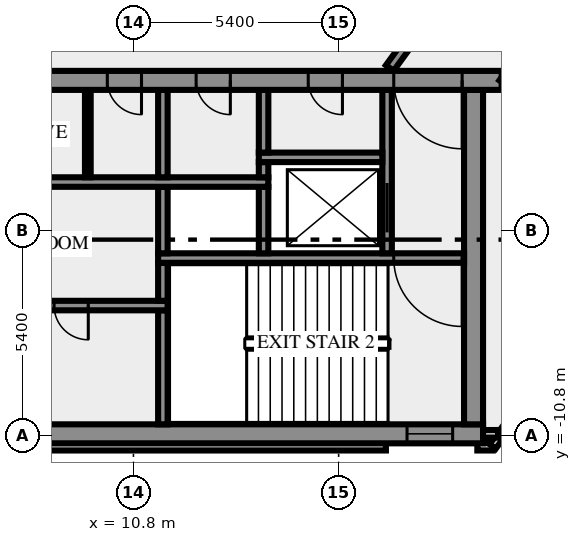
"""IFC4 building model, lengths in metres.
Left out: names, types, materials, properties, quantities, classifications, styles, units other than length and angle.
Written with IfcOpenShell. Run it as: python <this file> out.ifc"""

import sys

from ifc_helpers import new_model, si_unit, direction, frame, frame_2d, origin, place, context, subcontext, project, spatial, rectangle, extrude, element, fill, save


model = new_model("IFC4")
c1 = context("Model", 3, precision=1e-05, world=origin(), true_north=direction((0.0, 1.0)))
c2 = subcontext(c1, "Body", "Model", "MODEL_VIEW")
j1 = project(units=[si_unit("LENGTHUNIT", "METRE"), si_unit("PLANEANGLEUNIT", "RADIAN")], contexts=[c1])
p1 = place(None, origin())
s1 = spatial("IfcSite", under=j1, at=p1, CompositionType="ELEMENT")
p2 = place(p1, origin())
s2 = spatial("IfcBuilding", under=s1, at=p2, CompositionType="ELEMENT")
p3 = place(p2, frame((0.0, 0.0, 281.0)))
s3 = spatial("IfcBuildingStorey", under=s2, at=p3, CompositionType="ELEMENT", Elevation=281.0)
p4 = place(p3, frame((-17.444, -11.088, 0.0), z_axis=(0.0, 0.0, 1.0), x_axis=(1.0, 0.0, 0.0)))
e1 = element("IfcWall", 1, at=p4, inside=s3, PredefinedType="SOLIDWALL", context=c2, shape_type="SweptSolid", body=[
    extrude(rectangle(XDim=34.888, YDim=0.2, at=frame_2d((17.444, 0.0))), origin(), (0.0, 0.0, 1.0), 3.65),
])
p5 = place(p3, frame((19.85, -11.088, 0.0), z_axis=(0.0, 0.0, 1.0), x_axis=(1.0, 0.0, 0.0)))
e2 = element("IfcWall", 2, at=p5, inside=s3, PredefinedType="SOLIDWALL", context=c2, shape_type="SweptSolid", body=[
    extrude(rectangle(XDim=0.406, YDim=0.2, at=frame_2d((0.203, 0.0))), origin(), (0.0, 0.0, 1.0), 3.65),
])
p6 = place(p3, frame((20.253, -11.083, 0.0), z_axis=(0.0, 0.0, 1.0), x_axis=(0.587766567315, 0.809030569476, 0.0)))
e3 = element("IfcWall", 3, at=p6, inside=s3, PredefinedType="SOLIDWALL", context=c2, shape_type="SweptSolid", body=[
    extrude(rectangle(XDim=2.688, YDim=0.2, at=frame_2d((1.344, 0.0))), origin(), (0.0, 0.0, 1.0), 3.65),
])
p7 = place(p3, frame((19.98, -10.75, 0.0), z_axis=(0.0, 0.0, 1.0), x_axis=(1.0, 0.0, 0.0)))
e4 = element("IfcWall", 4, at=p7, inside=s3, PredefinedType="SOLIDWALL", context=c2, shape_type="SweptSolid", body=[
    extrude(rectangle(XDim=0.417, YDim=0.2, at=frame_2d((0.208, 0.0))), origin(), (0.0, 0.0, 1.0), 3.65),
])
p8 = place(p3, frame((-20.0, -10.75, 0.0), z_axis=(0.0, 0.0, 1.0), x_axis=(1.0, 0.0, 0.0)))
e5 = element("IfcWall", 5, at=p8, inside=s3, PredefinedType="SHEAR", context=c2, shape_type="SweptSolid", body=[
    extrude(rectangle(XDim=40.0, YDim=0.5, at=frame_2d((20.0, 0.0))), origin(), (0.0, 0.0, 1.0), 3.65),
])
p9 = place(p8, frame((0.8, 0.0, 1.0)))
e6 = element("IfcOpeningElement", 6, at=p9, cuts=e5, PredefinedType="OPENING", context=c2, shape_type="SweptSolid", body=[
    extrude(rectangle(XDim=1.2, YDim=1.2, at=frame_2d((0.6, 0.6))), frame((0.0, 0.26, 0.0), z_axis=(0.0, -1.0, 0.0), x_axis=(1.0, 0.0, 0.0)), (0.0, 0.0, 1.0), 0.52),
])
p10 = place(p8, frame((38.0, 0.0, 1.0)))
e7 = element("IfcOpeningElement", 7, at=p10, cuts=e5, PredefinedType="OPENING", context=c2, shape_type="SweptSolid", body=[
    extrude(rectangle(XDim=1.2, YDim=1.2, at=frame_2d((0.6, 0.6))), frame((0.0, 0.26, 0.0), z_axis=(0.0, -1.0, 0.0), x_axis=(1.0, 0.0, 0.0)), (0.0, 0.0, 1.0), 0.52),
])
p11 = place(p3, frame((11.575, -10.5, 0.0), z_axis=(0.0, 0.0, 1.0), x_axis=(0.0, 1.0, 0.0)))
e8 = element("IfcWall", 8, at=p11, inside=s3, PredefinedType="SHEAR", context=c2, shape_type="SweptSolid", body=[
    extrude(rectangle(XDim=3.0, YDim=0.25, at=frame_2d((1.5, 0.0))), origin(), (0.0, 0.0, 1.0), 3.65),
])
p12 = place(p3, frame((19.75, -10.5, 0.0), z_axis=(0.0, 0.0, 1.0), x_axis=(0.0, 1.0, 0.0)))
e9 = element("IfcWall", 9, at=p12, inside=s3, PredefinedType="SHEAR", context=c2, shape_type="SweptSolid", body=[
    extrude(rectangle(XDim=8.8, YDim=0.5, at=frame_2d((4.4, 0.0))), origin(), (0.0, 0.0, 1.0), 3.65),
])
p13 = place(p3, frame((11.7, -7.375, 0.0), z_axis=(0.0, 0.0, 1.0), x_axis=(-1.0, 0.0, 0.0)))
e10 = element("IfcWall", 10, at=p13, inside=s3, PredefinedType="SHEAR", context=c2, shape_type="SweptSolid", body=[
    extrude(rectangle(XDim=23.4, YDim=0.25, at=frame_2d((11.7, 0.0))), origin(), (0.0, 0.0, 1.0), 3.65),
])
p14 = place(p13, frame((22.225, 0.0, 0.0)))
e11 = element("IfcOpeningElement", 11, at=p14, cuts=e10, PredefinedType="OPENING", context=c2, shape_type="SweptSolid", body=[
    extrude(rectangle(XDim=0.8, YDim=2.1, at=frame_2d((0.4, 1.05))), frame((0.0, 0.135, 0.0), z_axis=(0.0, -1.0, 0.0), x_axis=(1.0, 0.0, 0.0)), (0.0, 0.0, 1.0), 0.27),
])
p15 = place(p13, frame((20.2, 0.0, 0.0)))
e12 = element("IfcOpeningElement", 12, at=p15, cuts=e10, PredefinedType="OPENING", context=c2, shape_type="SweptSolid", body=[
    extrude(rectangle(XDim=1.1, YDim=2.1, at=frame_2d((0.55, 1.05))), frame((0.0, 0.135, 0.0), z_axis=(0.0, -1.0, 0.0), x_axis=(1.0, 0.0, 0.0)), (0.0, 0.0, 1.0), 0.27),
])
p16 = place(p13, frame((17.7, 0.0, 0.0)))
e13 = element("IfcOpeningElement", 13, at=p16, cuts=e10, PredefinedType="OPENING", context=c2, shape_type="SweptSolid", body=[
    extrude(rectangle(XDim=1.1, YDim=2.1, at=frame_2d((0.55, 1.05))), frame((0.0, 0.135, 0.0), z_axis=(0.0, -1.0, 0.0), x_axis=(1.0, 0.0, 0.0)), (0.0, 0.0, 1.0), 0.27),
])
p17 = place(p13, frame((15.975, 0.0, 0.0)))
e14 = element("IfcOpeningElement", 14, at=p17, cuts=e10, PredefinedType="OPENING", context=c2, shape_type="SweptSolid", body=[
    extrude(rectangle(XDim=0.8, YDim=2.1, at=frame_2d((0.4, 1.05))), frame((0.0, 0.135, 0.0), z_axis=(0.0, -1.0, 0.0), x_axis=(1.0, 0.0, 0.0)), (0.0, 0.0, 1.0), 0.27),
])
p18 = place(p13, frame((14.75, 0.0, 0.0)))
e15 = element("IfcOpeningElement", 15, at=p18, cuts=e10, PredefinedType="OPENING", context=c2, shape_type="SweptSolid", body=[
    extrude(rectangle(XDim=0.7, YDim=2.1, at=frame_2d((0.35, 1.05))), frame((0.0, 0.135, 0.0), z_axis=(0.0, -1.0, 0.0), x_axis=(1.0, 0.0, 0.0)), (0.0, 0.0, 1.0), 0.27),
])
p19 = place(p13, frame((13.35, 0.0, 0.0)))
e16 = element("IfcOpeningElement", 16, at=p19, cuts=e10, PredefinedType="OPENING", context=c2, shape_type="SweptSolid", body=[
    extrude(rectangle(XDim=0.9, YDim=2.1, at=frame_2d((0.45, 1.05))), frame((0.0, 0.135, 0.0), z_axis=(0.0, -1.0, 0.0), x_axis=(1.0, 0.0, 0.0)), (0.0, 0.0, 1.0), 0.27),
])
p20 = place(p13, frame((11.975, 0.0, 0.0)))
e17 = element("IfcOpeningElement", 17, at=p20, cuts=e10, PredefinedType="OPENING", context=c2, shape_type="SweptSolid", body=[
    extrude(rectangle(XDim=0.9, YDim=2.1, at=frame_2d((0.45, 1.05))), frame((0.0, 0.135, 0.0), z_axis=(0.0, -1.0, 0.0), x_axis=(1.0, 0.0, 0.0)), (0.0, 0.0, 1.0), 0.27),
])
p21 = place(p13, frame((10.5, 0.0, 0.0)))
e18 = element("IfcOpeningElement", 18, at=p21, cuts=e10, PredefinedType="OPENING", context=c2, shape_type="SweptSolid", body=[
    extrude(rectangle(XDim=0.9, YDim=2.1, at=frame_2d((0.45, 1.05))), frame((0.0, 0.135, 0.0), z_axis=(0.0, -1.0, 0.0), x_axis=(1.0, 0.0, 0.0)), (0.0, 0.0, 1.0), 0.27),
])
p22 = place(p13, frame((8.663, 0.0, 0.0)))
e19 = element("IfcOpeningElement", 19, at=p22, cuts=e10, PredefinedType="OPENING", context=c2, shape_type="SweptSolid", body=[
    extrude(rectangle(XDim=0.9, YDim=2.1, at=frame_2d((0.45, 1.05))), frame((0.0, 0.135, 0.0), z_axis=(0.0, -1.0, 0.0), x_axis=(1.0, 0.0, 0.0)), (0.0, 0.0, 1.0), 0.27),
])
p23 = place(p13, frame((6.05, 0.0, 0.0)))
e20 = element("IfcOpeningElement", 20, at=p23, cuts=e10, PredefinedType="OPENING", context=c2, shape_type="SweptSolid", body=[
    extrude(rectangle(XDim=0.9, YDim=2.1, at=frame_2d((0.45, 1.05))), frame((0.0, 0.135, 0.0), z_axis=(0.0, -1.0, 0.0), x_axis=(1.0, 0.0, 0.0)), (0.0, 0.0, 1.0), 0.27),
])
p24 = place(p13, frame((2.088, 0.0, 0.0)))
e21 = element("IfcOpeningElement", 21, at=p24, cuts=e10, PredefinedType="OPENING", context=c2, shape_type="SweptSolid", body=[
    extrude(rectangle(XDim=0.9, YDim=2.1, at=frame_2d((0.45, 1.05))), frame((0.0, 0.135, 0.0), z_axis=(0.0, -1.0, 0.0), x_axis=(1.0, 0.0, 0.0)), (0.0, 0.0, 1.0), 0.27),
])
p25 = place(p3, frame((11.575, -7.25, 0.0), z_axis=(0.0, 0.0, 1.0), x_axis=(0.0, 1.0, 0.0)))
e22 = element("IfcWall", 22, at=p25, inside=s3, PredefinedType="SHEAR", context=c2, shape_type="SweptSolid", body=[
    extrude(rectangle(XDim=1.0, YDim=0.25, at=frame_2d((0.5, 0.0))), origin(), (0.0, 0.0, 1.0), 3.65),
])
p26 = place(p3, frame((19.5, -6.125, 0.0), z_axis=(0.0, 0.0, 1.0), x_axis=(-1.0, 0.0, 0.0)))
e23 = element("IfcWall", 23, at=p26, inside=s3, PredefinedType="SHEAR", context=c2, shape_type="SweptSolid", body=[
    extrude(rectangle(XDim=8.05, YDim=0.25, at=frame_2d((4.025, 0.0))), origin(), (0.0, 0.0, 1.0), 3.65),
])
p27 = place(p26, frame((0.05, 0.0, 0.0)))
e24 = element("IfcOpeningElement", 24, at=p27, cuts=e23, PredefinedType="OPENING", context=c2, shape_type="SweptSolid", body=[
    extrude(rectangle(XDim=1.8, YDim=2.1, at=frame_2d((0.9, 1.05))), frame((0.0, 0.135, 0.0), z_axis=(0.0, -1.0, 0.0), x_axis=(1.0, 0.0, 0.0)), (0.0, 0.0, 1.0), 0.27),
])
for number, where, z_axis, x_axis in (
    (25, (11.575, -6.0, 0.0), (0.0, 0.0, 1.0), (0.0, 1.0, 0.0)),
    (26, (14.225, -6.0, 0.0), (0.0, 0.0, 1.0), (0.0, 1.0, 0.0)),
):
    element("IfcWall", number, at=place(p3, frame(where, z_axis=z_axis, x_axis=x_axis)), inside=s3, PredefinedType="SHEAR", context=c2, shape_type="SweptSolid", body=[
        extrude(rectangle(XDim=1.75, YDim=0.25, at=frame_2d((0.875, 0.0))), origin(), (0.0, 0.0, 1.0), 3.65),
    ])
p28 = place(p3, frame((17.475, -6.0, 0.0), z_axis=(0.0, 0.0, 1.0), x_axis=(0.0, 1.0, 0.0)))
e27 = element("IfcWall", 27, at=p28, inside=s3, PredefinedType="SHEAR", context=c2, shape_type="SweptSolid", body=[
    extrude(rectangle(XDim=4.3, YDim=0.25, at=frame_2d((2.15, 0.0))), origin(), (0.0, 0.0, 1.0), 3.65),
])
p29 = place(p28, frame((0.55, 0.0, 0.0)))
e28 = element("IfcOpeningElement", 28, at=p29, cuts=e27, PredefinedType="OPENING", context=c2, shape_type="SweptSolid", body=[
    extrude(rectangle(XDim=1.3, YDim=2.1, at=frame_2d((0.65, 1.05))), frame((0.0, 0.135, 0.0), z_axis=(0.0, -1.0, 0.0), x_axis=(1.0, 0.0, 0.0)), (0.0, 0.0, 1.0), 0.27),
])
p30 = place(p3, frame((1.45, -4.125, 0.0), z_axis=(0.0, 0.0, 1.0), x_axis=(1.0, 0.0, 0.0)))
e29 = element("IfcWall", 29, at=p30, inside=s3, PredefinedType="SHEAR", context=c2, shape_type="SweptSolid", body=[
    extrude(rectangle(XDim=12.9, YDim=0.25, at=frame_2d((6.45, 0.0))), origin(), (0.0, 0.0, 1.0), 3.65),
])
p31 = place(p30, frame((0.7, 0.0, 0.0)))
e30 = element("IfcOpeningElement", 30, at=p31, cuts=e29, PredefinedType="OPENING", context=c2, shape_type="SweptSolid", body=[
    extrude(rectangle(XDim=1.3, YDim=2.1, at=frame_2d((0.65, 1.05))), frame((0.0, 0.135, 0.0), z_axis=(0.0, -1.0, 0.0), x_axis=(1.0, 0.0, 0.0)), (0.0, 0.0, 1.0), 0.27),
])
p32 = place(p3, frame((9.6, -4.0, 0.0), z_axis=(0.0, 0.0, 1.0), x_axis=(0.0, 1.0, 0.0)))
e31 = element("IfcWall", 31, at=p32, inside=s3, PredefinedType="PARTITIONING", context=c2, shape_type="SweptSolid", body=[
    extrude(rectangle(XDim=2.3, YDim=0.15, at=frame_2d((1.15, 0.0))), origin(), (0.0, 0.0, 1.0), 3.65),
])
p33 = place(p3, frame((11.575, -4.0, 0.0), z_axis=(0.0, 0.0, 1.0), x_axis=(0.0, 1.0, 0.0)))
e32 = element("IfcWall", 32, at=p33, inside=s3, PredefinedType="SHEAR", context=c2, shape_type="SweptSolid", body=[
    extrude(rectangle(XDim=2.3, YDim=0.25, at=frame_2d((1.15, 0.0))), origin(), (0.0, 0.0, 1.0), 3.65),
])
p34 = place(p3, frame((14.225, -4.0, 0.0), z_axis=(0.0, 0.0, 1.0), x_axis=(0.0, 1.0, 0.0)))
e33 = element("IfcWall", 33, at=p34, inside=s3, PredefinedType="SHEAR", context=c2, shape_type="SweptSolid", body=[
    extrude(rectangle(XDim=0.4, YDim=0.25, at=frame_2d((0.2, 0.0))), origin(), (0.0, 0.0, 1.0), 3.65),
])
p35 = place(p3, frame((14.1, -3.475, 0.0), z_axis=(0.0, 0.0, 1.0), x_axis=(1.0, 0.0, 0.0)))
e34 = element("IfcWall", 34, at=p35, inside=s3, PredefinedType="SHEAR", context=c2, shape_type="SweptSolid", body=[
    extrude(rectangle(XDim=3.25, YDim=0.25, at=frame_2d((1.625, 0.0))), origin(), (0.0, 0.0, 1.0), 3.65),
])
p36 = place(p3, frame((14.225, -3.35, 0.0), z_axis=(0.0, 0.0, 1.0), x_axis=(0.0, 1.0, 0.0)))
e35 = element("IfcWall", 35, at=p36, inside=s3, PredefinedType="SHEAR", context=c2, shape_type="SweptSolid", body=[
    extrude(rectangle(XDim=1.65, YDim=0.25, at=frame_2d((0.825, 0.0))), origin(), (0.0, 0.0, 1.0), 3.65),
])
p37 = place(p3, frame((20.49, -1.45, 0.0), z_axis=(0.0, 0.0, 1.0), x_axis=(-1.0, 0.0, 0.0)))
e36 = element("IfcWall", 36, at=p37, inside=s3, PredefinedType="SHEAR", context=c2, shape_type="SweptSolid", body=[
    extrude(rectangle(XDim=40.98, YDim=0.5, at=frame_2d((20.49, 0.0))), origin(), (0.0, 0.0, 1.0), 3.65),
])
p38 = place(p37, frame((38.14, 0.0, 0.0)))
e37 = element("IfcOpeningElement", 37, at=p38, cuts=e36, PredefinedType="OPENING", context=c2, shape_type="SweptSolid", body=[
    extrude(rectangle(XDim=1.8, YDim=2.1, at=frame_2d((0.9, 1.05))), frame((0.0, 0.26, 0.0), z_axis=(0.0, -1.0, 0.0), x_axis=(1.0, 0.0, 0.0)), (0.0, 0.0, 1.0), 0.52),
])
p39 = place(p37, frame((36.728, 0.0, 0.0)))
e38 = element("IfcOpeningElement", 38, at=p39, cuts=e36, PredefinedType="OPENING", context=c2, shape_type="SweptSolid", body=[
    extrude(rectangle(XDim=0.8, YDim=2.1, at=frame_2d((0.4, 1.05))), frame((0.0, 0.26, 0.0), z_axis=(0.0, -1.0, 0.0), x_axis=(1.0, 0.0, 0.0)), (0.0, 0.0, 1.0), 0.52),
])
p40 = place(p37, frame((35.153, 0.0, 0.0)))
e39 = element("IfcOpeningElement", 39, at=p40, cuts=e36, PredefinedType="OPENING", context=c2, shape_type="SweptSolid", body=[
    extrude(rectangle(XDim=0.8, YDim=2.1, at=frame_2d((0.4, 1.05))), frame((0.0, 0.26, 0.0), z_axis=(0.0, -1.0, 0.0), x_axis=(1.0, 0.0, 0.0)), (0.0, 0.0, 1.0), 0.52),
])
p41 = place(p37, frame((32.94, 0.0, 0.0)))
e40 = element("IfcOpeningElement", 40, at=p41, cuts=e36, PredefinedType="OPENING", context=c2, shape_type="SweptSolid", body=[
    extrude(rectangle(XDim=0.9, YDim=2.1, at=frame_2d((0.45, 1.05))), frame((0.0, 0.26, 0.0), z_axis=(0.0, -1.0, 0.0), x_axis=(1.0, 0.0, 0.0)), (0.0, 0.0, 1.0), 0.52),
])
p42 = place(p37, frame((31.015, 0.0, 0.0)))
e41 = element("IfcOpeningElement", 41, at=p42, cuts=e36, PredefinedType="OPENING", context=c2, shape_type="SweptSolid", body=[
    extrude(rectangle(XDim=0.8, YDim=2.1, at=frame_2d((0.4, 1.05))), frame((0.0, 0.26, 0.0), z_axis=(0.0, -1.0, 0.0), x_axis=(1.0, 0.0, 0.0)), (0.0, 0.0, 1.0), 0.52),
])
p43 = place(p37, frame((24.765, 0.0, 0.0)))
e42 = element("IfcOpeningElement", 42, at=p43, cuts=e36, PredefinedType="OPENING", context=c2, shape_type="SweptSolid", body=[
    extrude(rectangle(XDim=0.8, YDim=2.1, at=frame_2d((0.4, 1.05))), frame((0.0, 0.26, 0.0), z_axis=(0.0, -1.0, 0.0), x_axis=(1.0, 0.0, 0.0)), (0.0, 0.0, 1.0), 0.52),
])
p44 = place(p37, frame((19.59, 0.0, 0.0)))
e43 = element("IfcOpeningElement", 43, at=p44, cuts=e36, PredefinedType="OPENING", context=c2, shape_type="SweptSolid", body=[
    extrude(rectangle(XDim=2.0, YDim=2.1, at=frame_2d((1.0, 1.05))), frame((0.0, 0.26, 0.0), z_axis=(0.0, -1.0, 0.0), x_axis=(1.0, 0.0, 0.0)), (0.0, 0.0, 1.0), 0.52),
])
p45 = place(p37, frame((13.202, 0.0, 0.0)))
e44 = element("IfcOpeningElement", 44, at=p45, cuts=e36, PredefinedType="OPENING", context=c2, shape_type="SweptSolid", body=[
    extrude(rectangle(XDim=0.9, YDim=2.1, at=frame_2d((0.45, 1.05))), frame((0.0, 0.26, 0.0), z_axis=(0.0, -1.0, 0.0), x_axis=(1.0, 0.0, 0.0)), (0.0, 0.0, 1.0), 0.52),
])
p46 = place(p37, frame((9.478, 0.0, 0.0)))
e45 = element("IfcOpeningElement", 45, at=p46, cuts=e36, PredefinedType="OPENING", context=c2, shape_type="SweptSolid", body=[
    extrude(rectangle(XDim=0.9, YDim=2.1, at=frame_2d((0.45, 1.05))), frame((0.0, 0.26, 0.0), z_axis=(0.0, -1.0, 0.0), x_axis=(1.0, 0.0, 0.0)), (0.0, 0.0, 1.0), 0.52),
])
p47 = place(p37, frame((7.14, 0.0, 0.0)))
e46 = element("IfcOpeningElement", 46, at=p47, cuts=e36, PredefinedType="OPENING", context=c2, shape_type="SweptSolid", body=[
    extrude(rectangle(XDim=0.9, YDim=2.1, at=frame_2d((0.45, 1.05))), frame((0.0, 0.26, 0.0), z_axis=(0.0, -1.0, 0.0), x_axis=(1.0, 0.0, 0.0)), (0.0, 0.0, 1.0), 0.52),
])
p48 = place(p37, frame((4.19, 0.0, 0.0)))
e47 = element("IfcOpeningElement", 47, at=p48, cuts=e36, PredefinedType="OPENING", context=c2, shape_type="SweptSolid", body=[
    extrude(rectangle(XDim=0.9, YDim=2.1, at=frame_2d((0.45, 1.05))), frame((0.0, 0.26, 0.0), z_axis=(0.0, -1.0, 0.0), x_axis=(1.0, 0.0, 0.0)), (0.0, 0.0, 1.0), 0.52),
])
p49 = place(p37, frame((1.04, 0.0, 0.0)))
e48 = element("IfcOpeningElement", 48, at=p49, cuts=e36, PredefinedType="OPENING", context=c2, shape_type="SweptSolid", body=[
    extrude(rectangle(XDim=1.8, YDim=2.1, at=frame_2d((0.9, 1.05))), frame((0.0, 0.26, 0.0), z_axis=(0.0, -1.0, 0.0), x_axis=(1.0, 0.0, 0.0)), (0.0, 0.0, 1.0), 0.52),
])
p50 = place(p3, frame((17.545, -1.125, 0.0), z_axis=(0.0, 0.0, 1.0), x_axis=(0.58779555165, 0.809009511354, 0.0)))
e49 = element("IfcWall", 49, at=p50, inside=s3, PredefinedType="SOLIDWALL", context=c2, shape_type="SweptSolid", body=[
    extrude(rectangle(XDim=18.103, YDim=0.25, at=frame_2d((9.052, 0.0))), origin(), (0.0, 0.0, 1.0), 3.65),
])
p51 = place(p50, frame((16.728, 0.0, 0.0)))
e50 = element("IfcOpeningElement", 50, at=p51, cuts=e49, PredefinedType="OPENING", context=c2, shape_type="SweptSolid", body=[
    extrude(rectangle(XDim=0.9, YDim=2.1, at=frame_2d((0.45, 1.05))), frame((0.0, 0.135, 0.0), z_axis=(0.0, -1.0, 0.0), x_axis=(1.0, 0.0, 0.0)), (0.0, 0.0, 1.0), 0.27),
])
p52 = place(p3, frame((30.183, 11.761, 0.0), z_axis=(0.0, 0.0, 1.0), x_axis=(-0.587781762867, -0.80901952958, 0.0)))
e51 = element("IfcWall", 51, at=p52, inside=s3, PredefinedType="SOLIDWALL", context=c2, shape_type="SweptSolid", body=[
    extrude(rectangle(XDim=16.42, YDim=0.25, at=frame_2d((8.21, 0.0))), origin(), (0.0, 0.0, 1.0), 3.65),
])
p53 = place(p52, frame((5.005, 0.0, 0.0)))
e52 = element("IfcOpeningElement", 52, at=p53, cuts=e51, PredefinedType="OPENING", context=c2, shape_type="SweptSolid", body=[
    extrude(rectangle(XDim=0.9, YDim=2.1, at=frame_2d((0.45, 1.05))), frame((0.0, 0.135, 0.0), z_axis=(0.0, -1.0, 0.0), x_axis=(1.0, 0.0, 0.0)), (0.0, 0.0, 1.0), 0.27),
])
p54 = place(p52, frame((14.988, 0.0, 0.0)))
e53 = element("IfcOpeningElement", 53, at=p54, cuts=e51, PredefinedType="OPENING", context=c2, shape_type="SweptSolid", body=[
    extrude(rectangle(XDim=0.9, YDim=2.1, at=frame_2d((0.45, 1.05))), frame((0.0, 0.135, 0.0), z_axis=(0.0, -1.0, 0.0), x_axis=(1.0, 0.0, 0.0)), (0.0, 0.0, 1.0), 0.27),
])
p55 = place(p10, origin())
e54 = element("IfcWindow", 54, at=p55, inside=s3, PartitioningType="SINGLE_PANEL", PredefinedType="WINDOW", context=c2, shape_type="SweptSolid", body=[
    extrude(rectangle(XDim=1.2, YDim=1.2, at=frame_2d((0.6, 0.6))), frame((0.0, 0.03, 0.0), z_axis=(0.0, -1.0, 0.0), x_axis=(1.0, 0.0, 0.0)), (0.0, 0.0, 1.0), 0.06),
])
fill(e7, e54)
p56 = place(p24, origin())
e55 = element("IfcDoor", 55, at=p56, inside=s3, OperationType="SINGLE_SWING_LEFT", PredefinedType="DOOR", context=c2, shape_type="SweptSolid", body=[
    extrude(rectangle(XDim=0.9, YDim=2.1, at=frame_2d((0.45, 1.05))), frame((0.0, 0.025, 0.0), z_axis=(0.0, -1.0, 0.0), x_axis=(1.0, 0.0, 0.0)), (0.0, 0.0, 1.0), 0.05),
])
fill(e21, e55)
p57 = place(p27, origin())
e56 = element("IfcDoor", 56, at=p57, inside=s3, OperationType="DOUBLE_DOOR_SINGLE_SWING", PredefinedType="DOOR", context=c2, shape_type="SweptSolid", body=[
    extrude(rectangle(XDim=1.8, YDim=2.1, at=frame_2d((0.9, 1.05))), frame((0.0, 0.025, 0.0), z_axis=(0.0, -1.0, 0.0), x_axis=(1.0, 0.0, 0.0)), (0.0, 0.0, 1.0), 0.05),
])
fill(e24, e56)
p58 = place(p29, origin())
e57 = element("IfcDoor", 57, at=p58, inside=s3, OperationType="DOUBLE_DOOR_SLIDING", PredefinedType="DOOR", context=c2, shape_type="SweptSolid", body=[
    extrude(rectangle(XDim=1.3, YDim=2.1, at=frame_2d((0.65, 1.05))), frame((0.0, 0.025, 0.0), z_axis=(0.0, -1.0, 0.0), x_axis=(1.0, 0.0, 0.0)), (0.0, 0.0, 1.0), 0.05),
])
fill(e28, e57)
p59 = place(p46, origin())
e58 = element("IfcDoor", 58, at=p59, inside=s3, OperationType="SINGLE_SWING_LEFT", PredefinedType="DOOR", context=c2, shape_type="SweptSolid", body=[
    extrude(rectangle(XDim=0.9, YDim=2.1, at=frame_2d((0.45, 1.05))), frame((0.0, 0.025, 0.0), z_axis=(0.0, -1.0, 0.0), x_axis=(1.0, 0.0, 0.0)), (0.0, 0.0, 1.0), 0.05),
])
fill(e45, e58)
p60 = place(p47, origin())
e59 = element("IfcDoor", 59, at=p60, inside=s3, OperationType="SINGLE_SWING_LEFT", PredefinedType="DOOR", context=c2, shape_type="SweptSolid", body=[
    extrude(rectangle(XDim=0.9, YDim=2.1, at=frame_2d((0.45, 1.05))), frame((0.0, 0.025, 0.0), z_axis=(0.0, -1.0, 0.0), x_axis=(1.0, 0.0, 0.0)), (0.0, 0.0, 1.0), 0.05),
])
fill(e46, e59)
p61 = place(p48, origin())
e60 = element("IfcDoor", 60, at=p61, inside=s3, OperationType="SINGLE_SWING_LEFT", PredefinedType="DOOR", context=c2, shape_type="SweptSolid", body=[
    extrude(rectangle(XDim=0.9, YDim=2.1, at=frame_2d((0.45, 1.05))), frame((0.0, 0.025, 0.0), z_axis=(0.0, -1.0, 0.0), x_axis=(1.0, 0.0, 0.0)), (0.0, 0.0, 1.0), 0.05),
])
fill(e47, e60)
p62 = place(p49, origin())
e61 = element("IfcDoor", 61, at=p62, inside=s3, OperationType="DOUBLE_DOOR_SINGLE_SWING", PredefinedType="DOOR", context=c2, shape_type="SweptSolid", body=[
    extrude(rectangle(XDim=1.8, YDim=2.1, at=frame_2d((0.9, 1.05))), frame((0.0, 0.025, 0.0), z_axis=(0.0, -1.0, 0.0), x_axis=(1.0, 0.0, 0.0)), (0.0, 0.0, 1.0), 0.05),
])
fill(e48, e61)
save(model, sys.argv[1])
